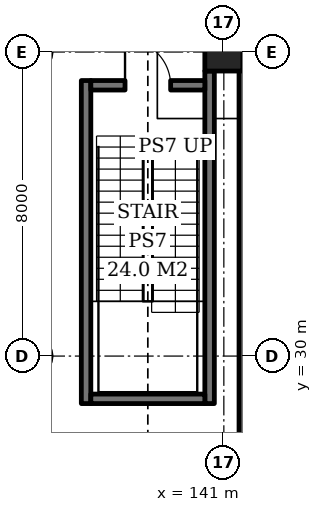
"""IFC4 building model, lengths in metres.
Left out: names, types, materials, properties, quantities, classifications, styles, units other than length and angle.
Written with IfcOpenShell. Run it as: python <this file> out.ifc"""

import sys

from ifc_helpers import new_model, si_unit, direction, frame, frame_2d, origin, origin_2d, place, context, subcontext, project, spatial, rectangle, extrude, element, fill, save


model = new_model("IFC4")
c1 = context("Model", 3, precision=1e-05, world=origin(), true_north=direction((0.0, 1.0)))
c2 = subcontext(c1, "Body", "Model", "MODEL_VIEW")
j1 = project(units=[si_unit("LENGTHUNIT", "METRE"), si_unit("PLANEANGLEUNIT", "RADIAN")], contexts=[c1])
p1 = place(None, origin())
s1 = spatial("IfcSite", under=j1, at=p1, CompositionType="ELEMENT")
p2 = place(p1, origin())
s2 = spatial("IfcBuilding", under=s1, at=p2, CompositionType="ELEMENT")
p3 = place(p2, frame((0.0, 0.0, -10.0)))
s3 = spatial("IfcBuildingStorey", under=s2, at=p3, CompositionType="ELEMENT", Elevation=-10.0)
p4 = place(p3, frame((141.0, 38.0, 0.0), z_axis=(0.0, 0.0, 1.0), x_axis=(1.0, 0.0, 0.0)))
e1 = element("IfcColumn", 1, at=p4, inside=s3, PredefinedType="COLUMN", context=c2, shape_type="SweptSolid", body=[
    extrude(rectangle(XDim=1.0, YDim=1.0, at=origin_2d()), origin(), (0.0, 0.0, 1.0), 5.0),
])
p5 = place(p3, frame((141.7, 5.6, -0.5), z_axis=(0.0, 0.0, 1.0), x_axis=(0.0, 1.0, 0.0)))
e2 = element("IfcWall", 2, at=p5, inside=s3, PredefinedType="USERDEFINED", context=c2, shape_type="SweptSolid", body=[
    extrude(rectangle(XDim=88.8, YDim=0.6, at=frame_2d((44.4, 0.0))), origin(), (0.0, 0.0, 1.0), 5.5),
])
p6 = place(p3, frame((137.375, 28.75, 0.0), z_axis=(0.0, 0.0, 1.0), x_axis=(0.0, 1.0, 0.0)))
e3 = element("IfcWall", 3, at=p6, inside=s3, PredefinedType="SOLIDWALL", context=c2, shape_type="SweptSolid", body=[
    extrude(rectangle(XDim=8.5, YDim=0.25, at=frame_2d((4.25, 0.0))), origin(), (0.0, 0.0, 1.0), 4.7),
])
p7 = place(p3, frame((140.625, 28.75, 0.0), z_axis=(0.0, 0.0, 1.0), x_axis=(0.0, 1.0, 0.0)))
e4 = element("IfcWall", 4, at=p7, inside=s3, PredefinedType="SOLIDWALL", context=c2, shape_type="SweptSolid", body=[
    extrude(rectangle(XDim=8.75, YDim=0.25, at=frame_2d((4.375, 0.0))), origin(), (0.0, 0.0, 1.0), 4.7),
])
p8 = place(p3, frame((137.5, 28.875, 0.0), z_axis=(0.0, 0.0, 1.0), x_axis=(1.0, 0.0, 0.0)))
e5 = element("IfcWall", 5, at=p8, inside=s3, PredefinedType="SOLIDWALL", context=c2, shape_type="SweptSolid", body=[
    extrude(rectangle(XDim=3.0, YDim=0.25, at=frame_2d((1.5, 0.0))), origin(), (0.0, 0.0, 1.0), 4.7),
])
p9 = place(p3, frame((137.5, 37.125, 0.0), z_axis=(0.0, 0.0, 1.0), x_axis=(1.0, 0.0, 0.0)))
e6 = element("IfcWall", 6, at=p9, inside=s3, PredefinedType="SOLIDWALL", context=c2, shape_type="SweptSolid", body=[
    extrude(rectangle(XDim=3.0, YDim=0.25, at=frame_2d((1.5, 0.0))), origin(), (0.0, 0.0, 1.0), 4.7),
])
p10 = place(p9, frame((0.9, 0.0, 0.0)))
e7 = element("IfcOpeningElement", 7, at=p10, cuts=e6, PredefinedType="OPENING", context=c2, shape_type="SweptSolid", body=[
    extrude(rectangle(XDim=1.2, YDim=2.1, at=frame_2d((0.6, 1.05))), frame((0.0, 0.135, 0.0), z_axis=(0.0, -1.0, 0.0), x_axis=(1.0, 0.0, 0.0)), (0.0, 0.0, 1.0), 0.27),
])
p11 = place(p10, origin())
e8 = element("IfcDoor", 8, at=p11, inside=s3, OperationType="SINGLE_SWING_LEFT", PredefinedType="DOOR", context=c2, shape_type="SweptSolid", body=[
    extrude(rectangle(XDim=1.2, YDim=2.1, at=frame_2d((0.6, 1.05))), frame((0.0, 0.025, 0.0), z_axis=(0.0, -1.0, 0.0), x_axis=(1.0, 0.0, 0.0)), (0.0, 0.0, 1.0), 0.05),
])
fill(e7, e8)
save(model, sys.argv[1])
